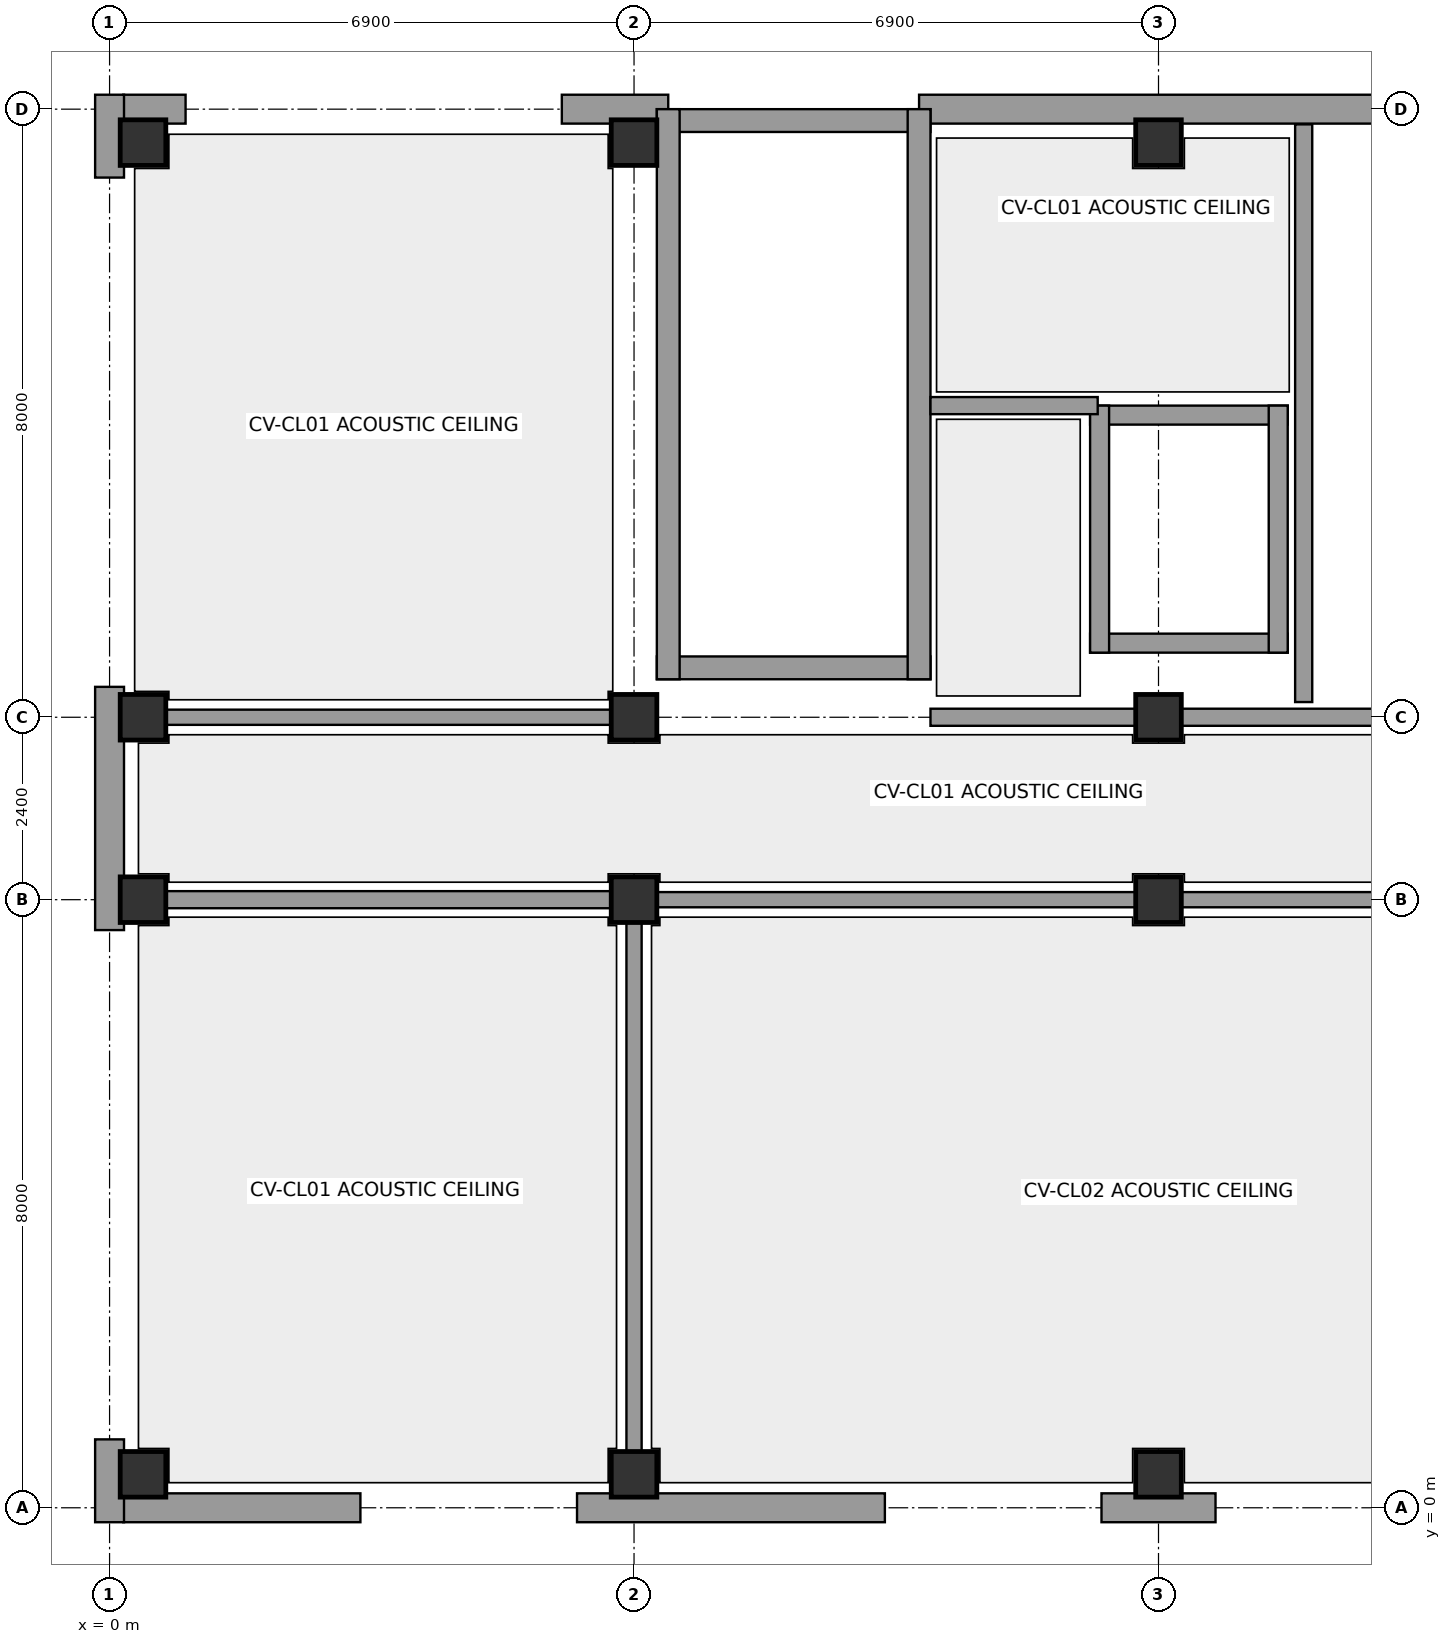
"""IFC4 building model, lengths in metres.
Left out: names, types, materials, properties, quantities, classifications, styles, units other than length and angle.
Written with IfcOpenShell. Run it as: python <this file> out.ifc"""

import sys

from ifc_helpers import new_model, si_unit, direction, frame, frame_2d, origin, origin_with_axes, origin_2d, place, context, subcontext, project, spatial, rectangle, extrude, element, fill, save


model = new_model("IFC4")
c1 = context("Model", 3, precision=1e-05, world=origin(), true_north=direction((0.0, 1.0)))
c2 = subcontext(c1, "Body", "Model", "MODEL_VIEW")
j1 = project(units=[si_unit("LENGTHUNIT", "METRE"), si_unit("PLANEANGLEUNIT", "RADIAN")], contexts=[c1])
p1 = place(None, origin())
s1 = spatial("IfcSite", under=j1, at=p1, CompositionType="ELEMENT")
p2 = place(p1, origin())
s2 = spatial("IfcBuilding", under=s1, at=p2, CompositionType="ELEMENT")
p3 = place(p2, origin())
s3 = spatial("IfcBuildingStorey", under=s2, at=p3, CompositionType="ELEMENT", Elevation=0.0)
for number, where, z_axis, x_axis in (
    (1, (0.44, 0.44, 0.0), (0.0, 0.0, 1.0), (1.0, 0.0, 0.0)),
    (2, (0.44, 8.0, 0.0), (0.0, 0.0, 1.0), (1.0, 0.0, 0.0)),
    (3, (0.44, 10.4, 0.0), (0.0, 0.0, 1.0), (1.0, 0.0, 0.0)),
    (4, (0.44, 17.96, 0.0), (0.0, 0.0, 1.0), (1.0, 0.0, 0.0)),
    (5, (6.9, 0.44, 0.0), (0.0, 0.0, 1.0), (1.0, 0.0, 0.0)),
    (6, (6.9, 8.0, 0.0), (0.0, 0.0, 1.0), (1.0, 0.0, 0.0)),
    (7, (6.9, 10.4, 0.0), (0.0, 0.0, 1.0), (1.0, 0.0, 0.0)),
    (8, (6.9, 17.96, 0.0), (0.0, 0.0, 1.0), (1.0, 0.0, 0.0)),
    (9, (13.8, 0.44, 0.0), (0.0, 0.0, 1.0), (1.0, 0.0, 0.0)),
    (10, (13.8, 8.0, 0.0), (0.0, 0.0, 1.0), (1.0, 0.0, 0.0)),
    (11, (13.8, 10.4, 0.0), (0.0, 0.0, 1.0), (1.0, 0.0, 0.0)),
    (12, (13.8, 17.96, 0.0), (0.0, 0.0, 1.0), (1.0, 0.0, 0.0)),
):
    element("IfcColumn", number, at=place(p3, frame(where, z_axis=z_axis, x_axis=x_axis)), inside=s3, PredefinedType="COLUMN", context=c2, shape_type="SweptSolid", body=[
        extrude(rectangle(XDim=0.6, YDim=0.6, at=origin_2d()), origin(), (0.0, 0.0, 1.0), 4.4),
    ])
p4 = place(p3, frame((0.18, 0.0, 0.0), z_axis=(0.0, 0.0, 1.0), x_axis=(1.0, 0.0, 0.0)))
e13 = element("IfcWall", 13, at=p4, inside=s3, PredefinedType="STANDARD", context=c2, shape_type="SweptSolid", body=[
    extrude(rectangle(XDim=3.12, YDim=0.38, at=frame_2d((1.56, 0.0))), origin(), (0.0, 0.0, 1.0), 4.12),
])
p5 = place(p4, frame((0.97, 0.0, 0.0)))
e14 = element("IfcOpeningElement", 14, at=p5, cuts=e13, PredefinedType="OPENING", context=c2, shape_type="SweptSolid", body=[
    extrude(rectangle(XDim=1.8, YDim=2.4, at=frame_2d((0.9, 1.2))), frame((0.0, 0.202, 0.0), z_axis=(0.0, -1.0, 0.0), x_axis=(1.0, 0.0, 0.0)), (0.0, 0.0, 1.0), 0.404),
])
p6 = place(p3, frame((6.15, 0.0, 0.0), z_axis=(0.0, 0.0, 1.0), x_axis=(1.0, 0.0, 0.0)))
e15 = element("IfcWall", 15, at=p6, inside=s3, PredefinedType="STANDARD", context=c2, shape_type="SweptSolid", body=[
    extrude(rectangle(XDim=4.05, YDim=0.38, at=frame_2d((2.025, 0.0))), origin(), (0.0, 0.0, 1.0), 4.12),
])
p7 = place(p6, frame((1.9, 0.0, 0.0)))
e16 = element("IfcOpeningElement", 16, at=p7, cuts=e15, PredefinedType="OPENING", context=c2, shape_type="SweptSolid", body=[
    extrude(rectangle(XDim=1.8, YDim=2.4, at=frame_2d((0.9, 1.2))), frame((0.0, 0.202, 0.0), z_axis=(0.0, -1.0, 0.0), x_axis=(1.0, 0.0, 0.0)), (0.0, 0.0, 1.0), 0.404),
])
p8 = place(p3, frame((13.05, 0.0, 0.0), z_axis=(0.0, 0.0, 1.0), x_axis=(1.0, 0.0, 0.0)))
e17 = element("IfcWall", 17, at=p8, inside=s3, PredefinedType="STANDARD", context=c2, shape_type="SweptSolid", body=[
    extrude(rectangle(XDim=1.5, YDim=0.38, at=frame_2d((0.75, 0.0))), origin(), (0.0, 0.0, 1.0), 4.12),
])
p9 = place(p3, frame((0.18, 18.4, 0.0), z_axis=(0.0, 0.0, 1.0), x_axis=(1.0, 0.0, 0.0)))
e18 = element("IfcWall", 18, at=p9, inside=s3, PredefinedType="STANDARD", context=c2, shape_type="SweptSolid", body=[
    extrude(rectangle(XDim=0.82, YDim=0.38, at=frame_2d((0.41, 0.0))), origin(), (0.0, 0.0, 1.0), 4.12),
])
p10 = place(p3, frame((5.95, 18.4, 0.0), z_axis=(0.0, 0.0, 1.0), x_axis=(1.0, 0.0, 0.0)))
e19 = element("IfcWall", 19, at=p10, inside=s3, PredefinedType="STANDARD", context=c2, shape_type="SweptSolid", body=[
    extrude(rectangle(XDim=1.4, YDim=0.38, at=frame_2d((0.7, 0.0))), origin(), (0.0, 0.0, 1.0), 4.12),
])
p11 = place(p3, frame((10.65, 18.4, 0.0), z_axis=(0.0, 0.0, 1.0), x_axis=(1.0, 0.0, 0.0)))
e20 = element("IfcWall", 20, at=p11, inside=s3, PredefinedType="STANDARD", context=c2, shape_type="SweptSolid", body=[
    extrude(rectangle(XDim=11.0, YDim=0.38, at=frame_2d((5.5, 0.0))), origin(), (0.0, 0.0, 1.0), 4.12),
])
p12 = place(p3, frame((0.0, -0.19, 0.0), z_axis=(0.0, 0.0, 1.0), x_axis=(0.0, 1.0, 0.0)))
e21 = element("IfcWall", 21, at=p12, inside=s3, PredefinedType="STANDARD", context=c2, shape_type="SweptSolid", body=[
    extrude(rectangle(XDim=1.09, YDim=0.38, at=frame_2d((0.545, 0.0))), origin(), (0.0, 0.0, 1.0), 4.12),
])
p13 = place(p3, frame((0.0, 7.6, 0.0), z_axis=(0.0, 0.0, 1.0), x_axis=(0.0, 1.0, 0.0)))
e22 = element("IfcWall", 22, at=p13, inside=s3, PredefinedType="STANDARD", context=c2, shape_type="SweptSolid", body=[
    extrude(rectangle(XDim=3.2, YDim=0.38, at=frame_2d((1.6, 0.0))), origin(), (0.0, 0.0, 1.0), 4.12),
])
p14 = place(p3, frame((0.0, 17.5, 0.0), z_axis=(0.0, 0.0, 1.0), x_axis=(0.0, 1.0, 0.0)))
e23 = element("IfcWall", 23, at=p14, inside=s3, PredefinedType="STANDARD", context=c2, shape_type="SweptSolid", body=[
    extrude(rectangle(XDim=1.09, YDim=0.38, at=frame_2d((0.545, 0.0))), origin(), (0.0, 0.0, 1.0), 4.12),
])
p15 = place(p3, frame((7.2, 18.25, 0.0), z_axis=(0.0, 0.0, 1.0), x_axis=(1.0, 0.0, 0.0)))
e24 = element("IfcWall", 24, at=p15, inside=s3, PredefinedType="SHEAR", context=c2, shape_type="SweptSolid", body=[
    extrude(rectangle(XDim=3.6, YDim=0.3, at=frame_2d((1.8, 0.0))), origin(), (0.0, 0.0, 1.0), 4.12),
])
p16 = place(p15, frame((1.1, 0.0, 0.0)))
e25 = element("IfcOpeningElement", 25, at=p16, cuts=e24, PredefinedType="OPENING", context=c2, shape_type="SweptSolid", body=[
    extrude(rectangle(XDim=1.4, YDim=2.25, at=frame_2d((0.7, 1.125))), frame((0.0, 0.162, 0.0), z_axis=(0.0, -1.0, 0.0), x_axis=(1.0, 0.0, 0.0)), (0.0, 0.0, 1.0), 0.324),
])
p17 = place(p3, frame((7.2, 11.05, 0.0), z_axis=(0.0, 0.0, 1.0), x_axis=(1.0, 0.0, 0.0)))
e26 = element("IfcWall", 26, at=p17, inside=s3, PredefinedType="SHEAR", context=c2, shape_type="SweptSolid", body=[
    extrude(rectangle(XDim=3.6, YDim=0.3, at=frame_2d((1.8, 0.0))), origin(), (0.0, 0.0, 1.0), 4.12),
])
p18 = place(p3, frame((7.35, 10.9, 0.0), z_axis=(0.0, 0.0, 1.0), x_axis=(0.0, 1.0, 0.0)))
e27 = element("IfcWall", 27, at=p18, inside=s3, PredefinedType="SHEAR", context=c2, shape_type="SweptSolid", body=[
    extrude(rectangle(XDim=7.5, YDim=0.3, at=frame_2d((3.75, 0.0))), origin(), (0.0, 0.0, 1.0), 4.12),
])
p19 = place(p3, frame((10.65, 10.9, 0.0), z_axis=(0.0, 0.0, 1.0), x_axis=(0.0, 1.0, 0.0)))
e28 = element("IfcWall", 28, at=p19, inside=s3, PredefinedType="SHEAR", context=c2, shape_type="SweptSolid", body=[
    extrude(rectangle(XDim=7.5, YDim=0.3, at=frame_2d((3.75, 0.0))), origin(), (0.0, 0.0, 1.0), 4.12),
])
p20 = place(p19, frame((5.7, 0.0, 0.0)))
e29 = element("IfcOpeningElement", 29, at=p20, cuts=e28, PredefinedType="OPENING", context=c2, shape_type="SweptSolid", body=[
    extrude(rectangle(XDim=1.15, YDim=2.15, at=frame_2d((0.575, 1.075))), frame((0.0, 0.162, 0.0), z_axis=(0.0, -1.0, 0.0), x_axis=(1.0, 0.0, 0.0)), (0.0, 0.0, 1.0), 0.324),
])
p21 = place(p3, frame((12.9, 14.375, 0.0), z_axis=(0.0, 0.0, 1.0), x_axis=(1.0, 0.0, 0.0)))
e30 = element("IfcWall", 30, at=p21, inside=s3, PredefinedType="SHEAR", context=c2, shape_type="SweptSolid", body=[
    extrude(rectangle(XDim=2.6, YDim=0.25, at=frame_2d((1.3, 0.0))), origin(), (0.0, 0.0, 1.0), 4.12),
])
p22 = place(p21, frame((0.875, 0.0, 0.0)))
e31 = element("IfcOpeningElement", 31, at=p22, cuts=e30, PredefinedType="OPENING", context=c2, shape_type="SweptSolid", body=[
    extrude(rectangle(XDim=1.1, YDim=2.1, at=frame_2d((0.55, 1.05))), frame((0.0, 0.137, 0.0), z_axis=(0.0, -1.0, 0.0), x_axis=(1.0, 0.0, 0.0)), (0.0, 0.0, 1.0), 0.274),
])
p23 = place(p3, frame((12.9, 11.375, 0.0), z_axis=(0.0, 0.0, 1.0), x_axis=(1.0, 0.0, 0.0)))
e32 = element("IfcWall", 32, at=p23, inside=s3, PredefinedType="SHEAR", context=c2, shape_type="SweptSolid", body=[
    extrude(rectangle(XDim=2.6, YDim=0.25, at=frame_2d((1.3, 0.0))), origin(), (0.0, 0.0, 1.0), 4.12),
])
for number, where, z_axis, x_axis in (
    (33, (13.025, 11.25, 0.0), (0.0, 0.0, 1.0), (0.0, 1.0, 0.0)),
    (34, (15.375, 11.25, 0.0), (0.0, 0.0, 1.0), (0.0, 1.0, 0.0)),
):
    element("IfcWall", number, at=place(p3, frame(where, z_axis=z_axis, x_axis=x_axis)), inside=s3, PredefinedType="SHEAR", context=c2, shape_type="SweptSolid", body=[
        extrude(rectangle(XDim=3.25, YDim=0.25, at=frame_2d((1.625, 0.0))), origin(), (0.0, 0.0, 1.0), 4.12),
    ])
p24 = place(p3, frame((15.71, 10.6, 0.0), z_axis=(0.0, 0.0, 1.0), x_axis=(0.0, 1.0, 0.0)))
e35 = element("IfcWall", 35, at=p24, inside=s3, PredefinedType="PARTITIONING", context=c2, shape_type="SweptSolid", body=[
    extrude(rectangle(XDim=7.6, YDim=0.225, at=frame_2d((3.8, 0.0))), origin(), (0.0, 0.0, 1.0), 3.79),
])
p25 = place(p3, frame((10.8, 14.5, 0.0), z_axis=(0.0, 0.0, 1.0), x_axis=(1.0, 0.0, 0.0)))
e36 = element("IfcWall", 36, at=p25, inside=s3, PredefinedType="PARTITIONING", context=c2, shape_type="SweptSolid", body=[
    extrude(rectangle(XDim=2.2, YDim=0.225, at=frame_2d((1.1, 0.0))), origin(), (0.0, 0.0, 1.0), 4.12),
])
p26 = place(p25, frame((0.45, 0.0, 0.0)))
e37 = element("IfcOpeningElement", 37, at=p26, cuts=e36, PredefinedType="OPENING", context=c2, shape_type="SweptSolid", body=[
    extrude(rectangle(XDim=1.1, YDim=2.15, at=frame_2d((0.55, 1.075))), frame((0.0, 0.125, 0.0), z_axis=(0.0, -1.0, 0.0), x_axis=(1.0, 0.0, 0.0)), (0.0, 0.0, 1.0), 0.249),
])
p27 = place(p3, frame((6.9, 10.4, 0.0), z_axis=(0.0, 0.0, 1.0), x_axis=(1.0, 0.0, 0.0)))
e38 = element("IfcWall", 38, at=p27, inside=s3, PredefinedType="PARTITIONING", context=c2, shape_type="SweptSolid", body=[
    extrude(rectangle(XDim=0.3, YDim=0.225, at=frame_2d((0.15, 0.0))), origin(), (0.0, 0.0, 1.0), 4.12),
])
p28 = place(p3, frame((10.8, 10.4, 0.0), z_axis=(0.0, 0.0, 1.0), x_axis=(1.0, 0.0, 0.0)))
e39 = element("IfcWall", 39, at=p28, inside=s3, PredefinedType="PARTITIONING", context=c2, shape_type="SweptSolid", body=[
    extrude(rectangle(XDim=9.9, YDim=0.225, at=frame_2d((4.95, 0.0))), origin(), (0.0, 0.0, 1.0), 3.56),
])
p29 = place(p28, frame((0.475, 0.0, 0.0)))
e40 = element("IfcOpeningElement", 40, at=p29, cuts=e39, PredefinedType="OPENING", context=c2, shape_type="SweptSolid", body=[
    extrude(rectangle(XDim=1.1, YDim=2.15, at=frame_2d((0.55, 1.075))), frame((0.0, 0.125, 0.0), z_axis=(0.0, -1.0, 0.0), x_axis=(1.0, 0.0, 0.0)), (0.0, 0.0, 1.0), 0.249),
])
p30 = place(p28, frame((5.75, 0.0, 0.0)))
e41 = element("IfcOpeningElement", 41, at=p30, cuts=e39, PredefinedType="OPENING", context=c2, shape_type="SweptSolid", body=[
    extrude(rectangle(XDim=0.9, YDim=2.1, at=frame_2d((0.45, 1.05))), frame((0.0, 0.125, 0.0), z_axis=(0.0, -1.0, 0.0), x_axis=(1.0, 0.0, 0.0)), (0.0, 0.0, 1.0), 0.249),
])
p31 = place(p28, frame((7.8, 0.0, 0.0)))
e42 = element("IfcOpeningElement", 42, at=p31, cuts=e39, PredefinedType="OPENING", context=c2, shape_type="SweptSolid", body=[
    extrude(rectangle(XDim=0.95, YDim=2.15, at=frame_2d((0.475, 1.075))), frame((0.0, 0.125, 0.0), z_axis=(0.0, -1.0, 0.0), x_axis=(1.0, 0.0, 0.0)), (0.0, 0.0, 1.0), 0.249),
])
p32 = place(p3, frame((0.3, 8.0, 0.0), z_axis=(0.0, 0.0, 1.0), x_axis=(1.0, 0.0, 0.0)))
e43 = element("IfcWall", 43, at=p32, inside=s3, PredefinedType="PARTITIONING", context=c2, shape_type="SweptSolid", body=[
    extrude(rectangle(XDim=6.45, YDim=0.225, at=frame_2d((3.225, 0.0))), origin(), (0.0, 0.0, 1.0), 3.56),
])
p33 = place(p32, frame((2.0, 0.0, 0.0)))
e44 = element("IfcOpeningElement", 44, at=p33, cuts=e43, PredefinedType="OPENING", context=c2, shape_type="SweptSolid", body=[
    extrude(rectangle(XDim=1.0, YDim=2.15, at=frame_2d((0.5, 1.075))), frame((0.0, 0.125, 0.0), z_axis=(0.0, -1.0, 0.0), x_axis=(1.0, 0.0, 0.0)), (0.0, 0.0, 1.0), 0.249),
])
p34 = place(p3, frame((6.9, 0.25, 0.0), z_axis=(0.0, 0.0, 1.0), x_axis=(0.0, 1.0, 0.0)))
e45 = element("IfcWall", 45, at=p34, inside=s3, PredefinedType="PARTITIONING", context=c2, shape_type="SweptSolid", body=[
    extrude(rectangle(XDim=7.6, YDim=0.2, at=frame_2d((3.8, 0.0))), origin(), (0.0, 0.0, 1.0), 3.56),
])
p35 = place(p3, frame((7.05, 8.0, 0.0), z_axis=(0.0, 0.0, 1.0), x_axis=(1.0, 0.0, 0.0)))
e46 = element("IfcWall", 46, at=p35, inside=s3, PredefinedType="PARTITIONING", context=c2, shape_type="SweptSolid", body=[
    extrude(rectangle(XDim=13.5, YDim=0.2, at=frame_2d((6.75, 0.0))), origin(), (0.0, 0.0, 1.0), 3.56),
])
p36 = place(p35, frame((2.0, 0.0, 0.0)))
e47 = element("IfcOpeningElement", 47, at=p36, cuts=e46, PredefinedType="OPENING", context=c2, shape_type="SweptSolid", body=[
    extrude(rectangle(XDim=1.0, YDim=2.15, at=frame_2d((0.5, 1.075))), frame((0.0, 0.112, 0.0), z_axis=(0.0, -1.0, 0.0), x_axis=(1.0, 0.0, 0.0)), (0.0, 0.0, 1.0), 0.224),
])
p37 = place(p3, frame((0.25, 10.4, 0.0), z_axis=(0.0, 0.0, 1.0), x_axis=(1.0, 0.0, 0.0)))
e48 = element("IfcWall", 48, at=p37, inside=s3, PredefinedType="PARTITIONING", context=c2, shape_type="SweptSolid", body=[
    extrude(rectangle(XDim=6.45, YDim=0.2, at=frame_2d((3.225, 0.0))), origin(), (0.0, 0.0, 1.0), 3.56),
])
p38 = place(p37, frame((1.9, 0.0, 0.0)))
e49 = element("IfcOpeningElement", 49, at=p38, cuts=e48, PredefinedType="OPENING", context=c2, shape_type="SweptSolid", body=[
    extrude(rectangle(XDim=0.95, YDim=2.15, at=frame_2d((0.475, 1.075))), frame((0.0, 0.112, 0.0), z_axis=(0.0, -1.0, 0.0), x_axis=(1.0, 0.0, 0.0)), (0.0, 0.0, 1.0), 0.224),
])
p39 = place(p5, frame((1.8, 0.0, 0.0), z_axis=(0.0, 0.0, 1.0), x_axis=(-1.0, 0.0, 0.0)))
e50 = element("IfcDoor", 50, at=p39, inside=s3, OperationType="DOUBLE_DOOR_SINGLE_SWING", PredefinedType="DOOR", context=c2, shape_type="SweptSolid", body=[
    extrude(rectangle(XDim=1.8, YDim=2.4, at=frame_2d((0.9, 1.2))), frame((0.0, 0.025, 0.0), z_axis=(0.0, -1.0, 0.0), x_axis=(1.0, 0.0, 0.0)), (0.0, 0.0, 1.0), 0.05),
])
fill(e14, e50)
p40 = place(p7, frame((1.8, 0.0, 0.0), z_axis=(0.0, 0.0, 1.0), x_axis=(-1.0, 0.0, 0.0)))
e51 = element("IfcDoor", 51, at=p40, inside=s3, OperationType="DOUBLE_DOOR_SINGLE_SWING", PredefinedType="DOOR", context=c2, shape_type="SweptSolid", body=[
    extrude(rectangle(XDim=1.8, YDim=2.4, at=frame_2d((0.9, 1.2))), frame((0.0, 0.025, 0.0), z_axis=(0.0, -1.0, 0.0), x_axis=(1.0, 0.0, 0.0)), (0.0, 0.0, 1.0), 0.05),
])
fill(e16, e51)
p41 = place(p16, origin_with_axes())
e52 = element("IfcDoor", 52, at=p41, inside=s3, OperationType="DOUBLE_DOOR_SINGLE_SWING", PredefinedType="DOOR", context=c2, shape_type="SweptSolid", body=[
    extrude(rectangle(XDim=1.4, YDim=2.25, at=frame_2d((0.7, 1.125))), frame((0.0, 0.025, 0.0), z_axis=(0.0, -1.0, 0.0), x_axis=(1.0, 0.0, 0.0)), (0.0, 0.0, 1.0), 0.05),
])
fill(e25, e52)
p42 = place(p20, origin_with_axes())
e53 = element("IfcDoor", 53, at=p42, inside=s3, OperationType="SINGLE_SWING_LEFT", PredefinedType="DOOR", context=c2, shape_type="SweptSolid", body=[
    extrude(rectangle(XDim=1.15, YDim=2.15, at=frame_2d((0.575, 1.075))), frame((0.0, 0.025, 0.0), z_axis=(0.0, -1.0, 0.0), x_axis=(1.0, 0.0, 0.0)), (0.0, 0.0, 1.0), 0.05),
])
fill(e29, e53)
p43 = place(p22, origin_with_axes())
e54 = element("IfcDoor", 54, at=p43, inside=s3, OperationType="SLIDING_TO_LEFT", PredefinedType="DOOR", context=c2, shape_type="SweptSolid", body=[
    extrude(rectangle(XDim=1.1, YDim=2.1, at=frame_2d((0.55, 1.05))), frame((0.0, 0.025, 0.0), z_axis=(0.0, -1.0, 0.0), x_axis=(1.0, 0.0, 0.0)), (0.0, 0.0, 1.0), 0.05),
])
fill(e31, e54)
p44 = place(p26, origin_with_axes())
e55 = element("IfcDoor", 55, at=p44, inside=s3, OperationType="SINGLE_SWING_RIGHT", PredefinedType="DOOR", context=c2, shape_type="SweptSolid", body=[
    extrude(rectangle(XDim=1.1, YDim=2.15, at=frame_2d((0.55, 1.075))), frame((0.0, 0.025, 0.0), z_axis=(0.0, -1.0, 0.0), x_axis=(1.0, 0.0, 0.0)), (0.0, 0.0, 1.0), 0.05),
])
fill(e37, e55)
p45 = place(p29, origin_with_axes())
e56 = element("IfcDoor", 56, at=p45, inside=s3, OperationType="SINGLE_SWING_LEFT", PredefinedType="DOOR", context=c2, shape_type="SweptSolid", body=[
    extrude(rectangle(XDim=1.1, YDim=2.15, at=frame_2d((0.55, 1.075))), frame((0.0, 0.025, 0.0), z_axis=(0.0, -1.0, 0.0), x_axis=(1.0, 0.0, 0.0)), (0.0, 0.0, 1.0), 0.05),
])
fill(e40, e56)
p46 = place(p30, frame((0.9, 0.0, 0.0), z_axis=(0.0, 0.0, 1.0), x_axis=(-1.0, 0.0, 0.0)))
e57 = element("IfcDoor", 57, at=p46, inside=s3, OperationType="SINGLE_SWING_LEFT", PredefinedType="DOOR", context=c2, shape_type="SweptSolid", body=[
    extrude(rectangle(XDim=0.9, YDim=2.1, at=frame_2d((0.45, 1.05))), frame((0.0, 0.025, 0.0), z_axis=(0.0, -1.0, 0.0), x_axis=(1.0, 0.0, 0.0)), (0.0, 0.0, 1.0), 0.05),
])
fill(e41, e57)
p47 = place(p33, frame((1.0, 0.0, 0.0), z_axis=(0.0, 0.0, 1.0), x_axis=(-1.0, 0.0, 0.0)))
e58 = element("IfcDoor", 58, at=p47, inside=s3, OperationType="SINGLE_SWING_LEFT", PredefinedType="DOOR", context=c2, shape_type="SweptSolid", body=[
    extrude(rectangle(XDim=1.0, YDim=2.15, at=frame_2d((0.5, 1.075))), frame((0.0, 0.025, 0.0), z_axis=(0.0, -1.0, 0.0), x_axis=(1.0, 0.0, 0.0)), (0.0, 0.0, 1.0), 0.05),
])
fill(e44, e58)
p48 = place(p36, origin_with_axes())
e59 = element("IfcDoor", 59, at=p48, inside=s3, OperationType="SINGLE_SWING_RIGHT", PredefinedType="DOOR", context=c2, shape_type="SweptSolid", body=[
    extrude(rectangle(XDim=1.0, YDim=2.15, at=frame_2d((0.5, 1.075))), frame((0.0, 0.025, 0.0), z_axis=(0.0, -1.0, 0.0), x_axis=(1.0, 0.0, 0.0)), (0.0, 0.0, 1.0), 0.05),
])
fill(e47, e59)
p49 = place(p38, origin_with_axes())
e60 = element("IfcDoor", 60, at=p49, inside=s3, OperationType="SINGLE_SWING_LEFT", PredefinedType="DOOR", context=c2, shape_type="SweptSolid", body=[
    extrude(rectangle(XDim=0.95, YDim=2.15, at=frame_2d((0.475, 1.075))), frame((0.0, 0.025, 0.0), z_axis=(0.0, -1.0, 0.0), x_axis=(1.0, 0.0, 0.0)), (0.0, 0.0, 1.0), 0.05),
])
fill(e49, e60)
save(model, sys.argv[1])
